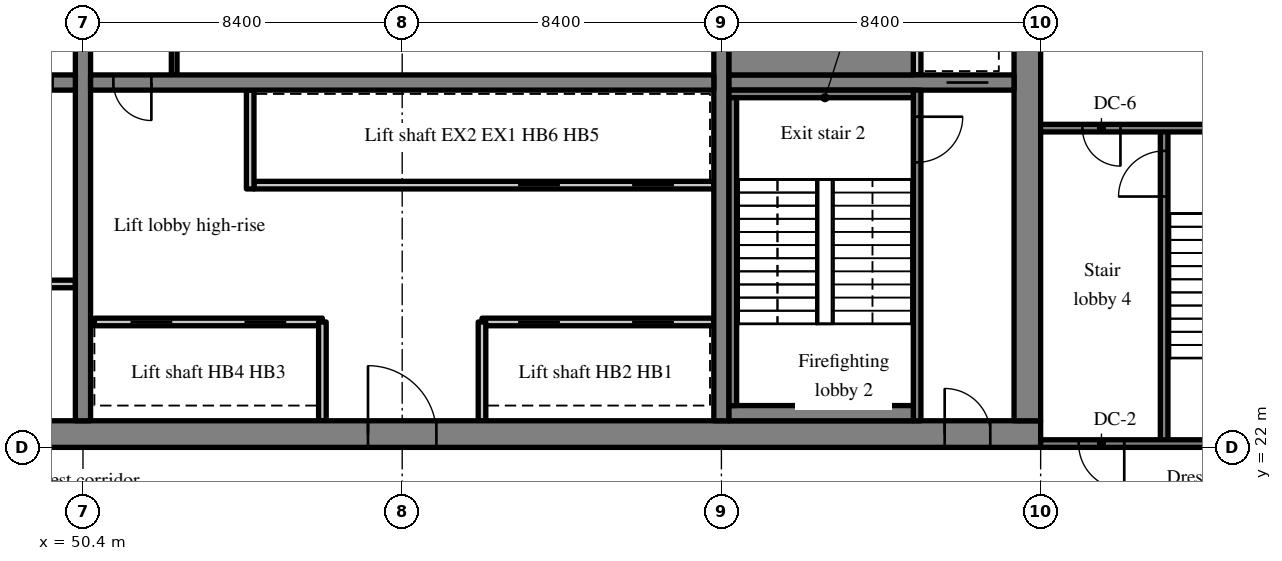
"""IFC4 building model, lengths in metres.
Left out: names, types, materials, properties, quantities, classifications, styles, units other than length and angle.
Written with IfcOpenShell. Run it as: python <this file> out.ifc"""

import sys

from ifc_helpers import new_model, si_unit, direction, frame, frame_2d, origin, place, context, subcontext, project, spatial, rectangle, extrude, source, transform, mapped, element, fill, save


model = new_model("IFC4")
c1 = context("Model", 3, precision=1e-05, world=origin(), true_north=direction((0.0, 1.0)))
c2 = subcontext(c1, "Body", "Model", "MODEL_VIEW")
j1 = project(units=[si_unit("LENGTHUNIT", "METRE"), si_unit("PLANEANGLEUNIT", "RADIAN")], contexts=[c1])
p1 = place(None, origin())
s1 = spatial("IfcSite", under=j1, at=p1, CompositionType="ELEMENT")
p2 = place(p1, origin())
s2 = spatial("IfcBuilding", under=s1, at=p2, CompositionType="ELEMENT")
p3 = place(p2, frame((0.0, 0.0, 174.4)))
s3 = spatial("IfcBuildingStorey", under=s2, at=p3, CompositionType="ELEMENT", Elevation=174.4)
m1 = source(origin(), c2, "Body", "SweptSolid", [
    extrude(rectangle(XDim=50.4, YDim=0.7, at=frame_2d((25.2, 0.0))), origin(), (0.0, 0.0, 1.0), 3.52),
])
p4 = place(p3, frame((25.2, 22.35, 0.0), z_axis=(0.0, 0.0, 1.0), x_axis=(1.0, 0.0, 0.0)))
e1 = element("IfcWall", 1, at=p4, inside=s3, PredefinedType="SHEAR", context=c2, shape_type="MappedRepresentation", body=[
    mapped(m1, transform((0.0, 0.0, 0.0), scale=1.0)),
])
m2 = source(origin(), c2, "Body", "SweptSolid", [
    extrude(rectangle(XDim=1.8, YDim=2.1, at=frame_2d((0.9, 1.05))), frame((0.0, 0.36, 0.0), z_axis=(0.0, -1.0, 0.0), x_axis=(1.0, 0.0, 0.0)), (0.0, 0.0, 1.0), 0.72),
])
p5 = place(p4, frame((15.9, 0.0, 0.0)))
e2 = element("IfcOpeningElement", 2, at=p5, cuts=e1, PredefinedType="OPENING", context=c2, shape_type="MappedRepresentation", body=[
    mapped(m2, transform((0.0, 0.0, 0.0), scale=1.0)),
])
m3 = source(origin(), c2, "Body", "SweptSolid", [
    extrude(rectangle(XDim=0.9, YDim=2.1, at=frame_2d((0.45, 1.05))), frame((0.0, 0.36, 0.0), z_axis=(0.0, -1.0, 0.0), x_axis=(1.0, 0.0, 0.0)), (0.0, 0.0, 1.0), 0.72),
])
p6 = place(p4, frame((11.2, 0.0, 0.0)))
e3 = element("IfcOpeningElement", 3, at=p6, cuts=e1, PredefinedType="OPENING", context=c2, shape_type="MappedRepresentation", body=[
    mapped(m3, transform((0.0, 0.0, 0.0), scale=1.0)),
])
p7 = place(p4, frame((21.5, 0.0, 0.0)))
e4 = element("IfcOpeningElement", 4, at=p7, cuts=e1, PredefinedType="OPENING", context=c2, shape_type="MappedRepresentation", body=[
    mapped(m3, transform((0.0, 0.0, 0.0), scale=1.0)),
])
p8 = place(p4, frame((32.7, 0.0, 0.0)))
e5 = element("IfcOpeningElement", 5, at=p8, cuts=e1, PredefinedType="OPENING", context=c2, shape_type="MappedRepresentation", body=[
    mapped(m2, transform((0.0, 0.0, 0.0), scale=1.0)),
])
m4 = source(origin(), c2, "Body", "SweptSolid", [
    extrude(rectangle(XDim=1.2, YDim=2.1, at=frame_2d((0.6, 1.05))), frame((0.0, 0.36, 0.0), z_axis=(0.0, -1.0, 0.0), x_axis=(1.0, 0.0, 0.0)), (0.0, 0.0, 1.0), 0.72),
])
p9 = place(p4, frame((6.475, 0.0, 0.0)))
e6 = element("IfcOpeningElement", 6, at=p9, cuts=e1, PredefinedType="OPENING", context=c2, shape_type="MappedRepresentation", body=[
    mapped(m4, transform((0.0, 0.0, 0.0), scale=1.0)),
])
p10 = place(p4, frame((47.875, 0.0, 0.0)))
e7 = element("IfcOpeningElement", 7, at=p10, cuts=e1, PredefinedType="OPENING", context=c2, shape_type="MappedRepresentation", body=[
    mapped(m4, transform((0.0, 0.0, 0.0), scale=1.0)),
])
m5 = source(origin(), c2, "Body", "SweptSolid", [
    extrude(rectangle(XDim=18.6, YDim=0.7, at=frame_2d((9.3, 0.0))), origin(), (0.0, 0.0, 1.0), 3.52),
])
p11 = place(p3, frame((75.25, 22.7, 0.0), z_axis=(0.0, 0.0, 1.0), x_axis=(0.0, 1.0, 0.0)))
e8 = element("IfcWall", 8, at=p11, inside=s3, PredefinedType="SHEAR", context=c2, shape_type="MappedRepresentation", body=[
    mapped(m5, transform((0.0, 0.0, 0.0), scale=1.0)),
])
p12 = place(p11, frame((12.7, 0.0, 0.0)))
e9 = element("IfcOpeningElement", 9, at=p12, cuts=e8, PredefinedType="OPENING", context=c2, shape_type="MappedRepresentation", body=[
    mapped(m4, transform((0.0, 0.0, 0.0), scale=1.0)),
])
m6 = source(origin(), c2, "Body", "SweptSolid", [
    extrude(rectangle(XDim=18.6, YDim=0.4, at=frame_2d((9.3, 0.0))), origin(), (0.0, 0.0, 1.0), 3.52),
])
p13 = place(p3, frame((50.4, 22.7, 0.0), z_axis=(0.0, 0.0, 1.0), x_axis=(0.0, 1.0, 0.0)))
e10 = element("IfcWall", 10, at=p13, inside=s3, PredefinedType="SHEAR", context=c2, shape_type="MappedRepresentation", body=[
    mapped(m6, transform((0.0, 0.0, 0.0), scale=1.0)),
])
m7 = source(origin(), c2, "Body", "SweptSolid", [
    extrude(rectangle(XDim=1.1, YDim=2.1, at=frame_2d((0.55, 1.05))), frame((0.0, 0.21, 0.0), z_axis=(0.0, -1.0, 0.0), x_axis=(1.0, 0.0, 0.0)), (0.0, 0.0, 1.0), 0.42),
])
p14 = place(p13, frame((12.75, 0.0, 0.0)))
e11 = element("IfcOpeningElement", 11, at=p14, cuts=e10, PredefinedType="OPENING", context=c2, shape_type="MappedRepresentation", body=[
    mapped(m7, transform((0.0, 0.0, 0.0), scale=1.0)),
])
p15 = place(p3, frame((67.2, 22.7, 0.0), z_axis=(0.0, 0.0, 1.0), x_axis=(0.0, 1.0, 0.0)))
e12 = element("IfcWall", 12, at=p15, inside=s3, PredefinedType="SHEAR", context=c2, shape_type="MappedRepresentation", body=[
    mapped(m6, transform((0.0, 0.0, 0.0), scale=1.0)),
])
m8 = source(origin(), c2, "Body", "SweptSolid", [
    extrude(rectangle(XDim=16.4, YDim=0.4, at=frame_2d((8.2, 0.0))), origin(), (0.0, 0.0, 1.0), 3.52),
])
p16 = place(p3, frame((33.8, 31.6, 0.0), z_axis=(0.0, 0.0, 1.0), x_axis=(1.0, 0.0, 0.0)))
e13 = element("IfcWall", 13, at=p16, inside=s3, PredefinedType="SHEAR", context=c2, shape_type="MappedRepresentation", body=[
    mapped(m8, transform((0.0, 0.0, 0.0), scale=1.0)),
])
m9 = source(origin(), c2, "Body", "SweptSolid", [
    extrude(rectangle(XDim=1.0, YDim=2.1, at=frame_2d((0.5, 1.05))), frame((0.0, 0.21, 0.0), z_axis=(0.0, -1.0, 0.0), x_axis=(1.0, 0.0, 0.0)), (0.0, 0.0, 1.0), 0.42),
])
p17 = place(p16, frame((14.8, 0.0, 0.0)))
e14 = element("IfcOpeningElement", 14, at=p17, cuts=e13, PredefinedType="OPENING", context=c2, shape_type="MappedRepresentation", body=[
    mapped(m9, transform((0.0, 0.0, 0.0), scale=1.0)),
])
p18 = place(p3, frame((50.6, 31.6, 0.0), z_axis=(0.0, 0.0, 1.0), x_axis=(1.0, 0.0, 0.0)))
e15 = element("IfcWall", 15, at=p18, inside=s3, PredefinedType="SHEAR", context=c2, shape_type="MappedRepresentation", body=[
    mapped(m8, transform((0.0, 0.0, 0.0), scale=1.0)),
])
p19 = place(p18, frame((0.6, 0.0, 0.0)))
e16 = element("IfcOpeningElement", 16, at=p19, cuts=e15, PredefinedType="OPENING", context=c2, shape_type="MappedRepresentation", body=[
    mapped(m9, transform((0.0, 0.0, 0.0), scale=1.0)),
])
m10 = source(origin(), c2, "Body", "SweptSolid", [
    extrude(rectangle(XDim=7.5, YDim=0.4, at=frame_2d((3.75, 0.0))), origin(), (0.0, 0.0, 1.0), 3.52),
])
p20 = place(p3, frame((67.4, 31.6, 0.0), z_axis=(0.0, 0.0, 1.0), x_axis=(1.0, 0.0, 0.0)))
e17 = element("IfcWall", 17, at=p20, inside=s3, PredefinedType="SHEAR", context=c2, shape_type="MappedRepresentation", body=[
    mapped(m10, transform((0.0, 0.0, 0.0), scale=1.0)),
])
p21 = place(p20, frame((5.725, 0.0, 0.0)))
e18 = element("IfcOpeningElement", 18, at=p21, cuts=e17, PredefinedType="OPENING", context=c2, shape_type="MappedRepresentation", body=[
    mapped(m7, transform((0.0, 0.0, 0.0), scale=1.0)),
])
m11 = source(origin(), c2, "Body", "SweptSolid", [
    extrude(rectangle(XDim=6.1, YDim=0.2, at=frame_2d((3.05, 0.0))), origin(), (0.0, 0.0, 1.0), 3.52),
])
p22 = place(p3, frame((44.1, 26.3, 0.0), z_axis=(0.0, 0.0, 1.0), x_axis=(1.0, 0.0, 0.0)))
e19 = element("IfcWall", 19, at=p22, inside=s3, PredefinedType="PARTITIONING", context=c2, shape_type="MappedRepresentation", body=[
    mapped(m11, transform((0.0, 0.0, 0.0), scale=1.0)),
])
m12 = source(origin(), c2, "Body", "SweptSolid", [
    extrude(rectangle(XDim=6.1, YDim=0.2, at=frame_2d((3.05, 0.0))), origin(), (0.0, 0.0, 1.0), 3.52),
])
p23 = place(p3, frame((67.0, 25.3, 0.0), z_axis=(0.0, 0.0, 1.0), x_axis=(-1.0, 0.0, 0.0)))
e20 = element("IfcWall", 20, at=p23, inside=s3, PredefinedType="SOLIDWALL", context=c2, shape_type="MappedRepresentation", body=[
    mapped(m12, transform((0.0, 0.0, 0.0), scale=1.0)),
])
m13 = source(origin(), c2, "Body", "SweptSolid", [
    extrude(rectangle(XDim=1.1, YDim=2.1, at=frame_2d((0.55, 1.05))), frame((0.0, 0.11, 0.0), z_axis=(0.0, -1.0, 0.0), x_axis=(1.0, 0.0, 0.0)), (0.0, 0.0, 1.0), 0.22),
])
p24 = place(p23, frame((1.05, 0.0, 0.0)))
e21 = element("IfcOpeningElement", 21, at=p24, cuts=e20, PredefinedType="OPENING", context=c2, shape_type="MappedRepresentation", body=[
    mapped(m13, transform((0.0, 0.0, 0.0), scale=1.0)),
])
p25 = place(p23, frame((4.05, 0.0, 0.0)))
e22 = element("IfcOpeningElement", 22, at=p25, cuts=e20, PredefinedType="OPENING", context=c2, shape_type="MappedRepresentation", body=[
    mapped(m13, transform((0.0, 0.0, 0.0), scale=1.0)),
])
m14 = source(origin(), c2, "Body", "SweptSolid", [
    extrude(rectangle(XDim=6.0, YDim=0.2, at=frame_2d((3.0, 0.0))), origin(), (0.0, 0.0, 1.0), 3.52),
])
p26 = place(p3, frame((56.7, 25.3, 0.0), z_axis=(0.0, 0.0, 1.0), x_axis=(-1.0, 0.0, 0.0)))
e23 = element("IfcWall", 23, at=p26, inside=s3, PredefinedType="SOLIDWALL", context=c2, shape_type="MappedRepresentation", body=[
    mapped(m14, transform((0.0, 0.0, 0.0), scale=1.0)),
])
p27 = place(p26, frame((0.95, 0.0, 0.0)))
e24 = element("IfcOpeningElement", 24, at=p27, cuts=e23, PredefinedType="OPENING", context=c2, shape_type="MappedRepresentation", body=[
    mapped(m13, transform((0.0, 0.0, 0.0), scale=1.0)),
])
p28 = place(p26, frame((3.95, 0.0, 0.0)))
e25 = element("IfcOpeningElement", 25, at=p28, cuts=e23, PredefinedType="OPENING", context=c2, shape_type="MappedRepresentation", body=[
    mapped(m13, transform((0.0, 0.0, 0.0), scale=1.0)),
])
m15 = source(origin(), c2, "Body", "SweptSolid", [
    extrude(rectangle(XDim=12.1, YDim=0.2, at=frame_2d((6.05, 0.0))), origin(), (0.0, 0.0, 1.0), 3.52),
])
p29 = place(p3, frame((67.0, 28.9, 0.0), z_axis=(0.0, 0.0, 1.0), x_axis=(-1.0, 0.0, 0.0)))
e26 = element("IfcWall", 26, at=p29, inside=s3, PredefinedType="SOLIDWALL", context=c2, shape_type="MappedRepresentation", body=[
    mapped(m15, transform((0.0, 0.0, 0.0), scale=1.0)),
])
p30 = place(p29, frame((1.05, 0.0, 0.0)))
e27 = element("IfcOpeningElement", 27, at=p30, cuts=e26, PredefinedType="OPENING", context=c2, shape_type="MappedRepresentation", body=[
    mapped(m13, transform((0.0, 0.0, 0.0), scale=1.0)),
])
p31 = place(p29, frame((4.05, 0.0, 0.0)))
e28 = element("IfcOpeningElement", 28, at=p31, cuts=e26, PredefinedType="OPENING", context=c2, shape_type="MappedRepresentation", body=[
    mapped(m13, transform((0.0, 0.0, 0.0), scale=1.0)),
])
m16 = source(origin(), c2, "Body", "SweptSolid", [
    extrude(rectangle(XDim=2.6, YDim=0.2, at=frame_2d((1.3, 0.0))), origin(), (0.0, 0.0, 1.0), 3.52),
])
for number, where, z_axis, x_axis in (
    (29, (60.9, 22.7, 0.0), (0.0, 0.0, 1.0), (0.0, 1.0, 0.0)),
    (30, (56.7, 22.7, 0.0), (0.0, 0.0, 1.0), (0.0, 1.0, 0.0)),
):
    element("IfcWall", number, at=place(p3, frame(where, z_axis=z_axis, x_axis=x_axis)), inside=s3, PredefinedType="SOLIDWALL", context=c2, shape_type="MappedRepresentation", body=[
        mapped(m16, transform((0.0, 0.0, 0.0), scale=1.0)),
    ])
m17 = source(origin(), c2, "Body", "SweptSolid", [
    extrude(rectangle(XDim=2.6, YDim=0.2, at=frame_2d((1.3, 0.0))), origin(), (0.0, 0.0, 1.0), 3.52),
])
p32 = place(p3, frame((54.8, 28.8, 0.0), z_axis=(0.0, 0.0, 1.0), x_axis=(0.0, 1.0, 0.0)))
e31 = element("IfcWall", 31, at=p32, inside=s3, PredefinedType="SOLIDWALL", context=c2, shape_type="MappedRepresentation", body=[
    mapped(m17, transform((0.0, 0.0, 0.0), scale=1.0)),
])
m18 = source(origin(), c2, "Body", "SweptSolid", [
    extrude(rectangle(XDim=3.2, YDim=0.15, at=frame_2d((1.6, 0.0))), origin(), (0.0, 0.0, 1.0), 3.52),
])
p33 = place(p3, frame((52.8, 31.8, 0.0), z_axis=(0.0, 0.0, 1.0), x_axis=(0.0, 1.0, 0.0)))
e32 = element("IfcWall", 32, at=p33, inside=s3, PredefinedType="PARTITIONING", context=c2, shape_type="MappedRepresentation", body=[
    mapped(m18, transform((0.0, 0.0, 0.0), scale=1.0)),
])
m19 = source(origin(), c2, "Body", "SweptSolid", [
    extrude(rectangle(XDim=8.7, YDim=0.2, at=frame_2d((4.35, 0.0))), origin(), (0.0, 0.0, 1.0), 3.52),
])
p34 = place(p3, frame((72.35, 22.7, 0.0), z_axis=(0.0, 0.0, 1.0), x_axis=(0.0, 1.0, 0.0)))
e33 = element("IfcWall", 33, at=p34, inside=s3, PredefinedType="SOLIDWALL", context=c2, shape_type="MappedRepresentation", body=[
    mapped(m19, transform((0.0, 0.0, 0.0), scale=1.0)),
])
m20 = source(origin(), c2, "Body", "SweptSolid", [
    extrude(rectangle(XDim=1.2, YDim=2.1, at=frame_2d((0.6, 1.05))), frame((0.0, 0.11, 0.0), z_axis=(0.0, -1.0, 0.0), x_axis=(1.0, 0.0, 0.0)), (0.0, 0.0, 1.0), 0.22),
])
p35 = place(p34, frame((6.8, 0.0, 0.0)))
e34 = element("IfcOpeningElement", 34, at=p35, cuts=e33, PredefinedType="OPENING", context=c2, shape_type="MappedRepresentation", body=[
    mapped(m20, transform((0.0, 0.0, 0.0), scale=1.0)),
])
m21 = source(origin(), c2, "Body", "SweptSolid", [
    extrude(rectangle(XDim=1.8, YDim=0.2, at=frame_2d((0.9, 0.0))), origin(), (0.0, 0.0, 1.0), 3.52),
])
p36 = place(p3, frame((72.35, 31.8, 0.0), z_axis=(0.0, 0.0, 1.0), x_axis=(0.0, 1.0, 0.0)))
e35 = element("IfcWall", 35, at=p36, inside=s3, PredefinedType="SOLIDWALL", context=c2, shape_type="MappedRepresentation", body=[
    mapped(m21, transform((0.0, 0.0, 0.0), scale=1.0)),
])
m22 = source(origin(), c2, "Body", "SweptSolid", [
    extrude(rectangle(XDim=8.3, YDim=0.2, at=frame_2d((4.15, 0.0))), origin(), (0.0, 0.0, 1.0), 3.52),
])
p37 = place(p3, frame((78.85, 22.1, 0.0), z_axis=(0.0, 0.0, 1.0), x_axis=(0.0, 1.0, 0.0)))
e36 = element("IfcWall", 36, at=p37, inside=s3, PredefinedType="SOLIDWALL", context=c2, shape_type="MappedRepresentation", body=[
    mapped(m22, transform((0.0, 0.0, 0.0), scale=1.0)),
])
p38 = place(p37, frame((6.5, 0.0, 0.0)))
e37 = element("IfcOpeningElement", 37, at=p38, cuts=e36, PredefinedType="OPENING", context=c2, shape_type="MappedRepresentation", body=[
    mapped(m20, transform((0.0, 0.0, 0.0), scale=1.0)),
])
m23 = source(origin(), c2, "Body", "SweptSolid", [
    extrude(rectangle(XDim=8.25, YDim=0.2, at=frame_2d((4.125, 0.0))), origin(), (0.0, 0.0, 1.0), 3.52),
])
p39 = place(p3, frame((83.85, 22.1, 0.0), z_axis=(0.0, 0.0, 1.0), x_axis=(-1.0, 0.0, 0.0)))
e38 = element("IfcWall", 38, at=p39, inside=s3, PredefinedType="SOLIDWALL", context=c2, shape_type="MappedRepresentation", body=[
    mapped(m23, transform((0.0, 0.0, 0.0), scale=1.0)),
])
p40 = place(p39, frame((6.05, 0.0, 0.0)))
e39 = element("IfcOpeningElement", 39, at=p40, cuts=e38, PredefinedType="OPENING", context=c2, shape_type="MappedRepresentation", body=[
    mapped(m20, transform((0.0, 0.0, 0.0), scale=1.0)),
])
p41 = place(p3, frame((83.85, 30.4, 0.0), z_axis=(0.0, 0.0, 1.0), x_axis=(-1.0, 0.0, 0.0)))
e40 = element("IfcWall", 40, at=p41, inside=s3, PredefinedType="SOLIDWALL", context=c2, shape_type="MappedRepresentation", body=[
    mapped(m23, transform((0.0, 0.0, 0.0), scale=1.0)),
])
m24 = source(origin(), c2, "Body", "SweptSolid", [
    extrude(rectangle(XDim=1.0, YDim=2.1, at=frame_2d((0.5, 1.05))), frame((0.0, 0.11, 0.0), z_axis=(0.0, -1.0, 0.0), x_axis=(1.0, 0.0, 0.0)), (0.0, 0.0, 1.0), 0.22),
])
p42 = place(p41, frame((6.15, 0.0, 0.0)))
e41 = element("IfcOpeningElement", 41, at=p42, cuts=e40, PredefinedType="OPENING", context=c2, shape_type="MappedRepresentation", body=[
    mapped(m24, transform((0.0, 0.0, 0.0), scale=1.0)),
])
m25 = source(origin(), c2, "Body", "SweptSolid", [
    extrude(rectangle(XDim=4.85, YDim=0.4, at=frame_2d((2.425, 0.0))), origin(), (0.0, 0.0, 1.0), 3.52),
])
p43 = place(p3, frame((67.4, 22.9, 0.0), z_axis=(0.0, 0.0, 1.0), x_axis=(1.0, 0.0, 0.0)))
e42 = element("IfcWall", 42, at=p43, inside=s3, PredefinedType="SOLIDWALL", context=c2, shape_type="MappedRepresentation", body=[
    mapped(m25, transform((0.0, 0.0, 0.0), scale=1.0)),
])
m26 = source(origin(), c2, "Body", "SweptSolid", [
    extrude(rectangle(XDim=4.85, YDim=0.2, at=frame_2d((2.425, 0.0))), origin(), (0.0, 0.0, 1.0), 3.52),
])
p44 = place(p3, frame((67.4, 31.3, 0.0), z_axis=(0.0, 0.0, 1.0), x_axis=(1.0, 0.0, 0.0)))
e43 = element("IfcWall", 43, at=p44, inside=s3, PredefinedType="SOLIDWALL", context=c2, shape_type="MappedRepresentation", body=[
    mapped(m26, transform((0.0, 0.0, 0.0), scale=1.0)),
])
m27 = source(origin(), c2, "Body", "SweptSolid", [
    extrude(rectangle(XDim=8.1, YDim=0.2, at=frame_2d((4.05, 0.0))), origin(), (0.0, 0.0, 1.0), 3.52),
])
p45 = place(p3, frame((67.5, 23.1, 0.0), z_axis=(0.0, 0.0, 1.0), x_axis=(0.0, 1.0, 0.0)))
e44 = element("IfcWall", 44, at=p45, inside=s3, PredefinedType="SOLIDWALL", context=c2, shape_type="MappedRepresentation", body=[
    mapped(m27, transform((0.0, 0.0, 0.0), scale=1.0)),
])
m28 = source(origin(), c2, "Body", "SweptSolid", [
    extrude(rectangle(XDim=4.85, YDim=1.0, at=frame_2d((2.425, 0.0))), origin(), (0.0, 0.0, 1.0), 3.52),
])
p46 = place(p3, frame((67.4, 32.3, 0.0), z_axis=(0.0, 0.0, 1.0), x_axis=(1.0, 0.0, 0.0)))
e45 = element("IfcWall", 45, at=p46, inside=s3, PredefinedType="SOLIDWALL", context=c2, shape_type="MappedRepresentation", body=[
    mapped(m28, transform((0.0, 0.0, 0.0), scale=1.0)),
])
m29 = source(origin(), c2, "Body", "SweptSolid", [
    extrude(rectangle(XDim=1.8, YDim=2.1, at=frame_2d((0.9, 1.05))), frame((0.0, 0.275, 0.0), z_axis=(0.0, -1.0, 0.0), x_axis=(1.0, 0.0, 0.0)), (0.0, 0.0, 1.0), 0.05),
])
p47 = place(p8, origin())
e46 = element("IfcDoor", 46, at=p47, inside=s3, OperationType="DOUBLE_DOOR_SINGLE_SWING", PredefinedType="DOOR", context=c2, shape_type="MappedRepresentation", body=[
    mapped(m29, transform((0.0, 0.0, 0.0), scale=1.0)),
])
fill(e5, e46)
m30 = source(origin(), c2, "Body", "SweptSolid", [
    extrude(rectangle(XDim=1.0, YDim=2.1, at=frame_2d((0.5, 1.05))), frame((0.0, 0.025, 0.0), z_axis=(0.0, -1.0, 0.0), x_axis=(1.0, 0.0, 0.0)), (0.0, 0.0, 1.0), 0.05),
])
p48 = place(p19, origin())
e47 = element("IfcDoor", 47, at=p48, inside=s3, OperationType="SINGLE_SWING_RIGHT", PredefinedType="DOOR", context=c2, shape_type="MappedRepresentation", body=[
    mapped(m30, transform((0.0, 0.0, 0.0), scale=1.0)),
])
fill(e16, e47)
m31 = source(origin(), c2, "Body", "SweptSolid", [
    extrude(rectangle(XDim=1.1, YDim=2.1, at=frame_2d((0.55, 1.05))), frame((0.0, 0.025, 0.0), z_axis=(0.0, -1.0, 0.0), x_axis=(1.0, 0.0, 0.0)), (0.0, 0.0, 1.0), 0.05),
])
p49 = place(p24, origin())
e48 = element("IfcDoor", 48, at=p49, inside=s3, OperationType="SLIDING_TO_RIGHT", PredefinedType="DOOR", context=c2, shape_type="MappedRepresentation", body=[
    mapped(m31, transform((0.0, 0.0, 0.0), scale=1.0)),
])
fill(e21, e48)
p50 = place(p25, origin())
e49 = element("IfcDoor", 49, at=p50, inside=s3, OperationType="SLIDING_TO_LEFT", PredefinedType="DOOR", context=c2, shape_type="MappedRepresentation", body=[
    mapped(m31, transform((0.0, 0.0, 0.0), scale=1.0)),
])
fill(e22, e49)
p51 = place(p27, origin())
e50 = element("IfcDoor", 50, at=p51, inside=s3, OperationType="SLIDING_TO_RIGHT", PredefinedType="DOOR", context=c2, shape_type="MappedRepresentation", body=[
    mapped(m31, transform((0.0, 0.0, 0.0), scale=1.0)),
])
fill(e24, e50)
p52 = place(p28, origin())
e51 = element("IfcDoor", 51, at=p52, inside=s3, OperationType="SLIDING_TO_LEFT", PredefinedType="DOOR", context=c2, shape_type="MappedRepresentation", body=[
    mapped(m31, transform((0.0, 0.0, 0.0), scale=1.0)),
])
fill(e25, e51)
p53 = place(p30, origin())
e52 = element("IfcDoor", 52, at=p53, inside=s3, OperationType="SLIDING_TO_RIGHT", PredefinedType="DOOR", context=c2, shape_type="MappedRepresentation", body=[
    mapped(m31, transform((0.0, 0.0, 0.0), scale=1.0)),
])
fill(e27, e52)
p54 = place(p31, origin())
e53 = element("IfcDoor", 53, at=p54, inside=s3, OperationType="SLIDING_TO_LEFT", PredefinedType="DOOR", context=c2, shape_type="MappedRepresentation", body=[
    mapped(m31, transform((0.0, 0.0, 0.0), scale=1.0)),
])
fill(e28, e53)
m32 = source(origin(), c2, "Body", "SweptSolid", [
    extrude(rectangle(XDim=1.2, YDim=2.1, at=frame_2d((0.6, 1.05))), frame((0.0, 0.025, 0.0), z_axis=(0.0, -1.0, 0.0), x_axis=(1.0, 0.0, 0.0)), (0.0, 0.0, 1.0), 0.05),
])
p55 = place(p35, origin())
e54 = element("IfcDoor", 54, at=p55, inside=s3, OperationType="SINGLE_SWING_RIGHT", PredefinedType="DOOR", context=c2, shape_type="MappedRepresentation", body=[
    mapped(m32, transform((0.0, 0.0, 0.0), scale=1.0)),
])
fill(e34, e54)
m33 = source(origin(), c2, "Body", "SweptSolid", [
    extrude(rectangle(XDim=1.2, YDim=2.1, at=frame_2d((0.6, 1.05))), frame((0.0, 0.275, 0.0), z_axis=(0.0, -1.0, 0.0), x_axis=(1.0, 0.0, 0.0)), (0.0, 0.0, 1.0), 0.05),
])
p56 = place(p10, origin())
e55 = element("IfcDoor", 55, at=p56, inside=s3, OperationType="SINGLE_SWING_LEFT", PredefinedType="DOOR", context=c2, shape_type="MappedRepresentation", body=[
    mapped(m33, transform((0.0, 0.0, 0.0), scale=1.0)),
])
fill(e7, e55)
p57 = place(p21, origin())
e56 = element("IfcDoor", 56, at=p57, inside=s3, OperationType="SLIDING_TO_LEFT", PredefinedType="DOOR", context=c2, shape_type="MappedRepresentation", body=[
    mapped(m31, transform((0.0, 0.0, 0.0), scale=1.0)),
])
fill(e18, e56)
p58 = place(p38, origin())
e57 = element("IfcDoor", 57, at=p58, inside=s3, OperationType="SINGLE_SWING_LEFT", PredefinedType="DOOR", context=c2, shape_type="MappedRepresentation", body=[
    mapped(m32, transform((0.0, 0.0, 0.0), scale=1.0)),
])
fill(e37, e57)
p59 = place(p40, origin())
e58 = element("IfcDoor", 58, at=p59, inside=s3, OperationType="SINGLE_SWING_LEFT", PredefinedType="DOOR", context=c2, shape_type="MappedRepresentation", body=[
    mapped(m32, transform((0.0, 0.0, 0.0), scale=1.0)),
])
fill(e39, e58)
p60 = place(p42, origin())
e59 = element("IfcDoor", 59, at=p60, inside=s3, OperationType="SINGLE_SWING_LEFT", PredefinedType="DOOR", context=c2, shape_type="MappedRepresentation", body=[
    mapped(m30, transform((0.0, 0.0, 0.0), scale=1.0)),
])
fill(e41, e59)
save(model, sys.argv[1])
